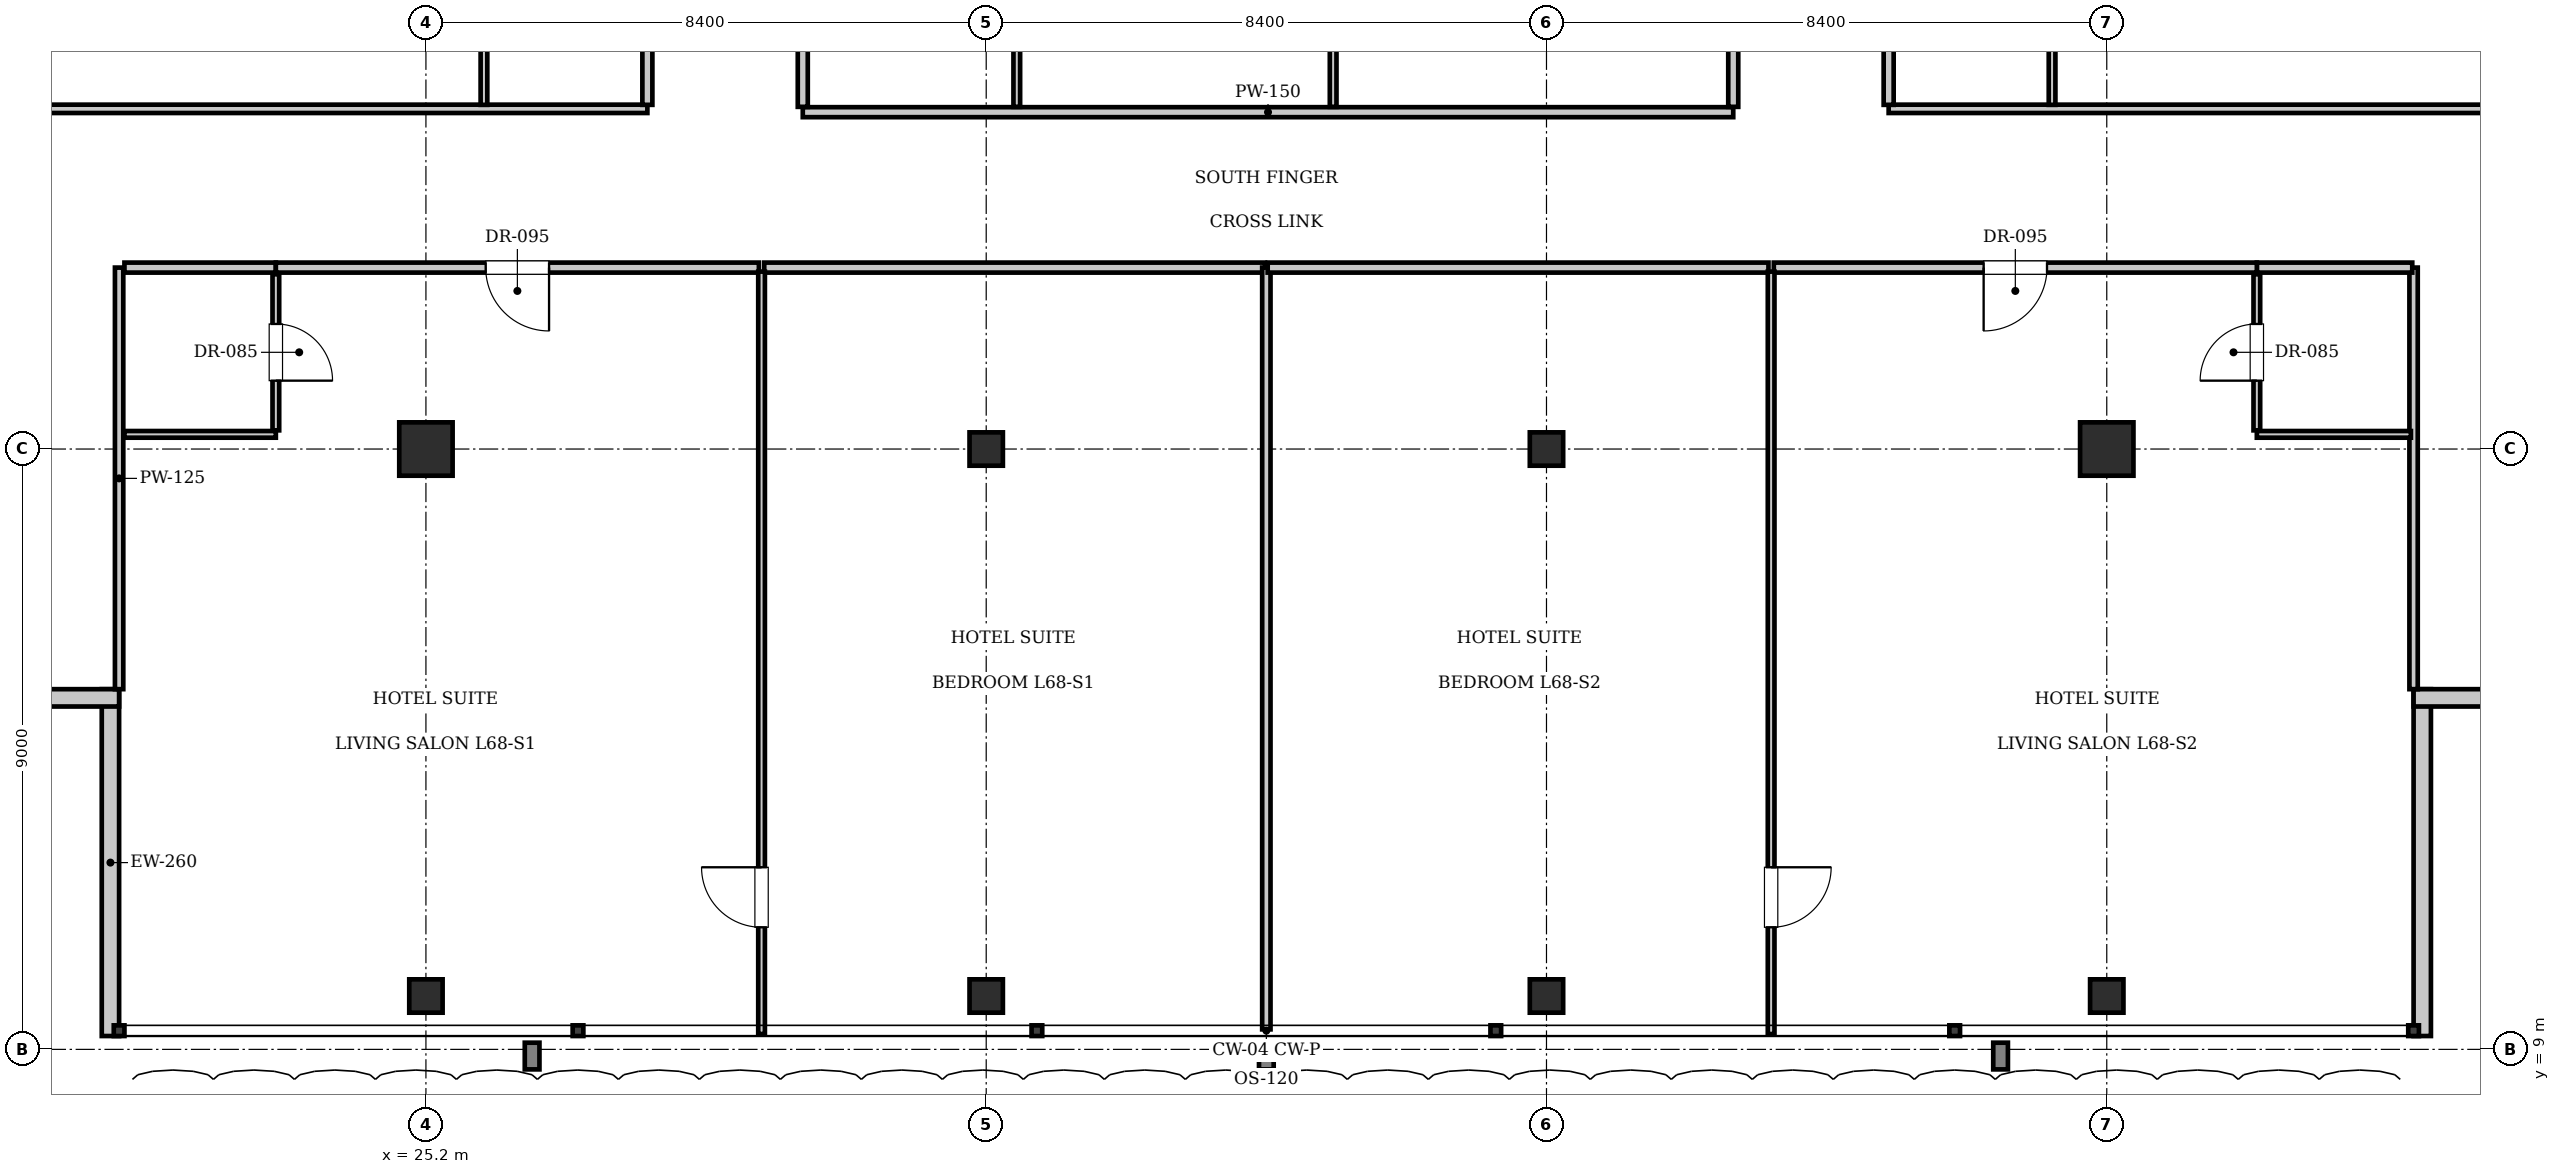
"""IFC4 building model, lengths in metres.
Left out: names, types, materials, properties, quantities, classifications, styles, units other than length and angle.
Written with IfcOpenShell. Run it as: python <this file> out.ifc"""

import sys

from ifc_helpers import new_model, si_unit, direction, frame, frame_2d, origin, origin_2d, place, context, subcontext, project, spatial, rectangle, i_section, extrude, element, fill, save


model = new_model("IFC4")
c1 = context("Model", 3, precision=1e-05, world=origin(), true_north=direction((0.0, 1.0)))
c2 = subcontext(c1, "Body", "Model", "MODEL_VIEW")
j1 = project(units=[si_unit("LENGTHUNIT", "METRE"), si_unit("PLANEANGLEUNIT", "RADIAN")], contexts=[c1])
p1 = place(None, origin())
s1 = spatial("IfcSite", under=j1, at=p1, CompositionType="ELEMENT")
p2 = place(p1, origin())
s2 = spatial("IfcBuilding", under=s1, at=p2, CompositionType="ELEMENT")
p3 = place(p2, frame((0.0, 0.0, 277.9)))
s3 = spatial("IfcBuildingStorey", under=s2, at=p3, CompositionType="ELEMENT", Elevation=277.9)
for number, where, z_axis, x_axis in (
    (1, (25.2, 18.0, 0.0), (0.0, 0.0, 1.0), (1.0, 0.0, 0.0)),
    (2, (50.4, 18.0, 0.0), (0.0, 0.0, 1.0), (1.0, 0.0, 0.0)),
):
    element("IfcColumn", number, at=place(p3, frame(where, z_axis=z_axis, x_axis=x_axis)), inside=s3, PredefinedType="COLUMN", context=c2, shape_type="SweptSolid", body=[
        extrude(rectangle(XDim=0.8, YDim=0.8, at=origin_2d()), origin(), (0.0, 0.0, 1.0), 3.85),
    ])
for number, where, z_axis, x_axis in (
    (3, (33.6, 18.0, 0.0), (0.0, 0.0, 1.0), (1.0, 0.0, 0.0)),
    (4, (42.0, 18.0, 0.0), (0.0, 0.0, 1.0), (1.0, 0.0, 0.0)),
    (5, (25.2, 9.8, 0.0), (0.0, 0.0, 1.0), (1.0, 0.0, 0.0)),
    (6, (33.6, 9.8, 0.0), (0.0, 0.0, 1.0), (1.0, 0.0, 0.0)),
    (7, (42.0, 9.8, 0.0), (0.0, 0.0, 1.0), (1.0, 0.0, 0.0)),
    (8, (50.4, 9.8, 0.0), (0.0, 0.0, 1.0), (1.0, 0.0, 0.0)),
):
    element("IfcColumn", number, at=place(p3, frame(where, z_axis=z_axis, x_axis=x_axis)), inside=s3, PredefinedType="COLUMN", context=c2, shape_type="SweptSolid", body=[
        extrude(i_section(OverallWidth=0.5, OverallDepth=0.5, WebThickness=0.022, FlangeThickness=0.032, at=origin_2d()), origin(), (0.0, 0.0, 1.0), 3.85),
    ])
p4 = place(p3, frame((20.47, 9.2, 0.0), z_axis=(0.0, 0.0, 1.0), x_axis=(0.0, 1.0, 0.0)))
e9 = element("IfcWall", 9, at=p4, inside=s3, PredefinedType="SOLIDWALL", context=c2, shape_type="SweptSolid", body=[
    extrude(rectangle(XDim=5.2, YDim=0.26, at=frame_2d((2.6, 0.0))), origin(), (0.0, 0.0, 1.0), 3.61),
])
p5 = place(p3, frame((20.6, 14.27, 0.0), z_axis=(0.0, 0.0, 1.0), x_axis=(-1.0, 0.0, 0.0)))
e10 = element("IfcWall", 10, at=p5, inside=s3, PredefinedType="SOLIDWALL", context=c2, shape_type="SweptSolid", body=[
    extrude(rectangle(XDim=5.2, YDim=0.26, at=frame_2d((2.6, 0.0))), origin(), (0.0, 0.0, 1.0), 3.61),
])
p6 = place(p5, frame((1.6, 0.0, 0.9)))
e11 = element("IfcOpeningElement", 11, at=p6, cuts=e10, PredefinedType="OPENING", context=c2, shape_type="SweptSolid", body=[
    extrude(rectangle(XDim=2.0, YDim=2.2, at=frame_2d((1.0, 1.1))), frame((0.0, 0.14, 0.0), z_axis=(0.0, -1.0, 0.0), x_axis=(1.0, 0.0, 0.0)), (0.0, 0.0, 1.0), 0.28),
])
p7 = place(p3, frame((55.13, 14.4, 0.0), z_axis=(0.0, 0.0, 1.0), x_axis=(0.0, -1.0, 0.0)))
e12 = element("IfcWall", 12, at=p7, inside=s3, PredefinedType="SOLIDWALL", context=c2, shape_type="SweptSolid", body=[
    extrude(rectangle(XDim=5.2, YDim=0.26, at=frame_2d((2.6, 0.0))), origin(), (0.0, 0.0, 1.0), 3.61),
])
p8 = place(p3, frame((60.2, 14.27, 0.0), z_axis=(0.0, 0.0, 1.0), x_axis=(-1.0, 0.0, 0.0)))
e13 = element("IfcWall", 13, at=p8, inside=s3, PredefinedType="SOLIDWALL", context=c2, shape_type="SweptSolid", body=[
    extrude(rectangle(XDim=5.2, YDim=0.26, at=frame_2d((2.6, 0.0))), origin(), (0.0, 0.0, 1.0), 3.61),
])
p9 = place(p8, frame((1.6, 0.0, 0.9)))
e14 = element("IfcOpeningElement", 14, at=p9, cuts=e13, PredefinedType="OPENING", context=c2, shape_type="SweptSolid", body=[
    extrude(rectangle(XDim=2.0, YDim=2.2, at=frame_2d((1.0, 1.1))), frame((0.0, 0.14, 0.0), z_axis=(0.0, -1.0, 0.0), x_axis=(1.0, 0.0, 0.0)), (0.0, 0.0, 1.0), 0.28),
])
p10 = place(p3, frame((30.85, 23.05, 0.0), z_axis=(0.0, 0.0, 1.0), x_axis=(1.0, 0.0, 0.0)))
e15 = element("IfcWall", 15, at=p10, inside=s3, PredefinedType="PARTITIONING", context=c2, shape_type="SweptSolid", body=[
    extrude(rectangle(XDim=13.95, YDim=0.15, at=frame_2d((6.975, 0.0))), origin(), (0.0, 0.0, 1.0), 3.61),
])
for number, where, z_axis, x_axis in (
    (16, (30.85, 23.13, 0.0), (0.0, 0.0, 1.0), (0.0, 1.0, 0.0)),
    (17, (44.8, 23.13, 0.0), (0.0, 0.0, 1.0), (0.0, 1.0, 0.0)),
):
    element("IfcWall", number, at=place(p3, frame(where, z_axis=z_axis, x_axis=x_axis)), inside=s3, PredefinedType="PARTITIONING", context=c2, shape_type="SweptSolid", body=[
        extrude(rectangle(XDim=7.89, YDim=0.15, at=frame_2d((3.945, 0.0))), origin(), (0.0, 0.0, 1.0), 3.61),
    ])
for number, where, z_axis, x_axis in (
    (18, (34.059, 23.13, 0.0), (0.0, 0.0, 1.0), (0.0, 1.0, 0.0)),
    (19, (38.802, 23.13, 0.0), (0.0, 0.0, 1.0), (0.0, 1.0, 0.0)),
):
    element("IfcWall", number, at=place(p3, frame(where, z_axis=z_axis, x_axis=x_axis)), inside=s3, PredefinedType="PARTITIONING", context=c2, shape_type="SweptSolid", body=[
        extrude(rectangle(XDim=7.89, YDim=0.1, at=frame_2d((3.945, 0.0))), origin(), (0.0, 0.0, 1.0), 3.61),
    ])
for number, where, z_axis, x_axis in (
    (20, (20.6, 14.4, 0.0), (0.0, 0.0, 1.0), (0.0, 1.0, 0.0)),
    (21, (55.0, 14.4, 0.0), (0.0, 0.0, 1.0), (0.0, 1.0, 0.0)),
):
    element("IfcWall", number, at=place(p3, frame(where, z_axis=z_axis, x_axis=x_axis)), inside=s3, PredefinedType="PARTITIONING", context=c2, shape_type="SweptSolid", body=[
        extrude(rectangle(XDim=6.32, YDim=0.125, at=frame_2d((3.16, 0.0))), origin(), (0.0, 0.0, 1.0), 3.61),
    ])
p11 = place(p3, frame((20.68, 20.72, 0.0), z_axis=(0.0, 0.0, 1.0), x_axis=(1.0, 0.0, 0.0)))
e22 = element("IfcWall", 22, at=p11, inside=s3, PredefinedType="PARTITIONING", context=c2, shape_type="SweptSolid", body=[
    extrude(rectangle(XDim=2.27, YDim=0.15, at=frame_2d((1.135, 0.0))), origin(), (0.0, 0.0, 1.0), 3.61),
])
p12 = place(p3, frame((20.68, 18.22, 0.0), z_axis=(0.0, 0.0, 1.0), x_axis=(1.0, 0.0, 0.0)))
e23 = element("IfcWall", 23, at=p12, inside=s3, PredefinedType="PARTITIONING", context=c2, shape_type="SweptSolid", body=[
    extrude(rectangle(XDim=2.27, YDim=0.1, at=frame_2d((1.135, 0.0))), origin(), (0.0, 0.0, 1.0), 3.61),
])
p13 = place(p3, frame((22.95, 18.28, 0.0), z_axis=(0.0, 0.0, 1.0), x_axis=(0.0, 1.0, 0.0)))
e24 = element("IfcWall", 24, at=p13, inside=s3, PredefinedType="PARTITIONING", context=c2, shape_type="SweptSolid", body=[
    extrude(rectangle(XDim=2.34, YDim=0.1, at=frame_2d((1.17, 0.0))), origin(), (0.0, 0.0, 1.0), 3.61),
])
p14 = place(p13, frame((0.745, 0.0, 0.0)))
e25 = element("IfcOpeningElement", 25, at=p14, cuts=e24, PredefinedType="OPENING", context=c2, shape_type="SweptSolid", body=[
    extrude(rectangle(XDim=0.85, YDim=2.1, at=frame_2d((0.425, 1.05))), frame((0.0, 0.06, 0.0), z_axis=(0.0, -1.0, 0.0), x_axis=(1.0, 0.0, 0.0)), (0.0, 0.0, 1.0), 0.12),
])
p15 = place(p3, frame((22.95, 20.72, 0.0), z_axis=(0.0, 0.0, 1.0), x_axis=(1.0, 0.0, 0.0)))
e26 = element("IfcWall", 26, at=p15, inside=s3, PredefinedType="PARTITIONING", context=c2, shape_type="SweptSolid", body=[
    extrude(rectangle(XDim=7.242, YDim=0.15, at=frame_2d((3.621, 0.0))), origin(), (0.0, 0.0, 1.0), 3.61),
])
p16 = place(p15, frame((3.146, 0.0, 0.0)))
e27 = element("IfcOpeningElement", 27, at=p16, cuts=e26, PredefinedType="OPENING", context=c2, shape_type="SweptSolid", body=[
    extrude(rectangle(XDim=0.95, YDim=2.15, at=frame_2d((0.475, 1.075))), frame((0.0, 0.085, 0.0), z_axis=(0.0, -1.0, 0.0), x_axis=(1.0, 0.0, 0.0)), (0.0, 0.0, 1.0), 0.17),
])
p17 = place(p3, frame((30.272, 20.72, 0.0), z_axis=(0.0, 0.0, 1.0), x_axis=(1.0, 0.0, 0.0)))
e28 = element("IfcWall", 28, at=p17, inside=s3, PredefinedType="PARTITIONING", context=c2, shape_type="SweptSolid", body=[
    extrude(rectangle(XDim=7.508, YDim=0.15, at=frame_2d((3.754, 0.0))), origin(), (0.0, 0.0, 1.0), 3.61),
])
p18 = place(p3, frame((30.232, 9.23, 0.0), z_axis=(0.0, 0.0, 1.0), x_axis=(0.0, 1.0, 0.0)))
e29 = element("IfcWall", 29, at=p18, inside=s3, PredefinedType="PARTITIONING", context=c2, shape_type="SweptSolid", body=[
    extrude(rectangle(XDim=11.43, YDim=0.1, at=frame_2d((5.715, 0.0))), origin(), (0.0, 0.0, 1.0), 3.61),
])
p19 = place(p18, frame((1.6, 0.0, 0.0)))
e30 = element("IfcOpeningElement", 30, at=p19, cuts=e29, PredefinedType="OPENING", context=c2, shape_type="SweptSolid", body=[
    extrude(rectangle(XDim=0.9, YDim=2.1, at=frame_2d((0.45, 1.05))), frame((0.0, 0.06, 0.0), z_axis=(0.0, -1.0, 0.0), x_axis=(1.0, 0.0, 0.0)), (0.0, 0.0, 1.0), 0.12),
])
p20 = place(p3, frame((37.8, 9.3, 0.0), z_axis=(0.0, 0.0, 1.0), x_axis=(0.0, 1.0, 0.0)))
e31 = element("IfcWall", 31, at=p20, inside=s3, PredefinedType="PARTITIONING", context=c2, shape_type="SweptSolid", body=[
    extrude(rectangle(XDim=11.42, YDim=0.125, at=frame_2d((5.71, 0.0))), origin(), (0.0, 0.0, 1.0), 3.293),
])
p21 = place(p3, frame((52.65, 20.72, 0.0), z_axis=(0.0, 0.0, 1.0), x_axis=(1.0, 0.0, 0.0)))
e32 = element("IfcWall", 32, at=p21, inside=s3, PredefinedType="PARTITIONING", context=c2, shape_type="SweptSolid", body=[
    extrude(rectangle(XDim=2.33, YDim=0.15, at=frame_2d((1.165, 0.0))), origin(), (0.0, 0.0, 1.0), 3.61),
])
p22 = place(p3, frame((52.65, 18.22, 0.0), z_axis=(0.0, 0.0, 1.0), x_axis=(1.0, 0.0, 0.0)))
e33 = element("IfcWall", 33, at=p22, inside=s3, PredefinedType="PARTITIONING", context=c2, shape_type="SweptSolid", body=[
    extrude(rectangle(XDim=2.31, YDim=0.1, at=frame_2d((1.155, 0.0))), origin(), (0.0, 0.0, 1.0), 3.61),
])
p23 = place(p3, frame((52.65, 18.28, 0.0), z_axis=(0.0, 0.0, 1.0), x_axis=(0.0, 1.0, 0.0)))
e34 = element("IfcWall", 34, at=p23, inside=s3, PredefinedType="PARTITIONING", context=c2, shape_type="SweptSolid", body=[
    extrude(rectangle(XDim=2.34, YDim=0.1, at=frame_2d((1.17, 0.0))), origin(), (0.0, 0.0, 1.0), 3.61),
])
p24 = place(p23, frame((0.745, 0.0, 0.0)))
e35 = element("IfcOpeningElement", 35, at=p24, cuts=e34, PredefinedType="OPENING", context=c2, shape_type="SweptSolid", body=[
    extrude(rectangle(XDim=0.85, YDim=2.1, at=frame_2d((0.425, 1.05))), frame((0.0, 0.06, 0.0), z_axis=(0.0, -1.0, 0.0), x_axis=(1.0, 0.0, 0.0)), (0.0, 0.0, 1.0), 0.12),
])
p25 = place(p3, frame((37.82, 20.72, 0.0), z_axis=(0.0, 0.0, 1.0), x_axis=(1.0, 0.0, 0.0)))
e36 = element("IfcWall", 36, at=p25, inside=s3, PredefinedType="PARTITIONING", context=c2, shape_type="SweptSolid", body=[
    extrude(rectangle(XDim=7.508, YDim=0.15, at=frame_2d((3.754, 0.0))), origin(), (0.0, 0.0, 1.0), 3.61),
])
p26 = place(p3, frame((45.408, 20.72, 0.0), z_axis=(0.0, 0.0, 1.0), x_axis=(1.0, 0.0, 0.0)))
e37 = element("IfcWall", 37, at=p26, inside=s3, PredefinedType="PARTITIONING", context=c2, shape_type="SweptSolid", body=[
    extrude(rectangle(XDim=7.242, YDim=0.15, at=frame_2d((3.621, 0.0))), origin(), (0.0, 0.0, 1.0), 3.61),
])
p27 = place(p26, frame((3.146, 0.0, 0.0)))
e38 = element("IfcOpeningElement", 38, at=p27, cuts=e37, PredefinedType="OPENING", context=c2, shape_type="SweptSolid", body=[
    extrude(rectangle(XDim=0.95, YDim=2.15, at=frame_2d((0.475, 1.075))), frame((0.0, 0.085, 0.0), z_axis=(0.0, -1.0, 0.0), x_axis=(1.0, 0.0, 0.0)), (0.0, 0.0, 1.0), 0.17),
])
p28 = place(p3, frame((45.368, 9.23, 0.0), z_axis=(0.0, 0.0, 1.0), x_axis=(0.0, 1.0, 0.0)))
e39 = element("IfcWall", 39, at=p28, inside=s3, PredefinedType="PARTITIONING", context=c2, shape_type="SweptSolid", body=[
    extrude(rectangle(XDim=11.43, YDim=0.1, at=frame_2d((5.715, 0.0))), origin(), (0.0, 0.0, 1.0), 3.61),
])
p29 = place(p28, frame((1.6, 0.0, 0.0)))
e40 = element("IfcOpeningElement", 40, at=p29, cuts=e39, PredefinedType="OPENING", context=c2, shape_type="SweptSolid", body=[
    extrude(rectangle(XDim=0.9, YDim=2.1, at=frame_2d((0.45, 1.05))), frame((0.0, 0.06, 0.0), z_axis=(0.0, -1.0, 0.0), x_axis=(1.0, 0.0, 0.0)), (0.0, 0.0, 1.0), 0.12),
])
p30 = place(p3, frame((15.5, 23.1, 0.0), z_axis=(0.0, 0.0, 1.0), x_axis=(1.0, 0.0, 0.0)))
e41 = element("IfcWall", 41, at=p30, inside=s3, PredefinedType="PARTITIONING", context=c2, shape_type="SweptSolid", body=[
    extrude(rectangle(XDim=13.02, YDim=0.125, at=frame_2d((6.51, 0.0))), origin(), (0.0, 0.0, 1.0), 3.61),
])
p31 = place(p3, frame((47.13, 23.1, 0.0), z_axis=(0.0, 0.0, 1.0), x_axis=(1.0, 0.0, 0.0)))
e42 = element("IfcWall", 42, at=p31, inside=s3, PredefinedType="PARTITIONING", context=c2, shape_type="SweptSolid", body=[
    extrude(rectangle(XDim=12.97, YDim=0.125, at=frame_2d((6.485, 0.0))), origin(), (0.0, 0.0, 1.0), 3.61),
])
p32 = place(p3, frame((28.52, 23.16, 0.0), z_axis=(0.0, 0.0, 1.0), x_axis=(0.0, 1.0, 0.0)))
e43 = element("IfcWall", 43, at=p32, inside=s3, PredefinedType="PARTITIONING", context=c2, shape_type="SweptSolid", body=[
    extrude(rectangle(XDim=1.89, YDim=0.15, at=frame_2d((0.945, 0.0))), origin(), (0.0, 0.0, 1.0), 3.61),
])
p33 = place(p3, frame((26.07, 23.16, 0.0), z_axis=(0.0, 0.0, 1.0), x_axis=(0.0, 1.0, 0.0)))
e44 = element("IfcWall", 44, at=p33, inside=s3, PredefinedType="PARTITIONING", context=c2, shape_type="SweptSolid", body=[
    extrude(rectangle(XDim=1.89, YDim=0.1, at=frame_2d((0.945, 0.0))), origin(), (0.0, 0.0, 1.0), 3.61),
])
p34 = place(p3, frame((47.13, 23.16, 0.0), z_axis=(0.0, 0.0, 1.0), x_axis=(0.0, 1.0, 0.0)))
e45 = element("IfcWall", 45, at=p34, inside=s3, PredefinedType="PARTITIONING", context=c2, shape_type="SweptSolid", body=[
    extrude(rectangle(XDim=1.89, YDim=0.15, at=frame_2d((0.945, 0.0))), origin(), (0.0, 0.0, 1.0), 3.61),
])
p35 = place(p3, frame((49.58, 23.16, 0.0), z_axis=(0.0, 0.0, 1.0), x_axis=(0.0, 1.0, 0.0)))
e46 = element("IfcWall", 46, at=p35, inside=s3, PredefinedType="PARTITIONING", context=c2, shape_type="SweptSolid", body=[
    extrude(rectangle(XDim=1.89, YDim=0.1, at=frame_2d((0.945, 0.0))), origin(), (0.0, 0.0, 1.0), 3.61),
])
p36 = place(p14, frame((0.85, 0.0, 0.0), z_axis=(0.0, 0.0, 1.0), x_axis=(-1.0, 0.0, 0.0)))
e47 = element("IfcDoor", 47, at=p36, inside=s3, OperationType="SINGLE_SWING_RIGHT", PredefinedType="DOOR", context=c2, shape_type="SweptSolid", body=[
    extrude(rectangle(XDim=0.85, YDim=2.1, at=frame_2d((0.425, 1.05))), frame((0.0, 0.025, 0.0), z_axis=(0.0, -1.0, 0.0), x_axis=(1.0, 0.0, 0.0)), (0.0, 0.0, 1.0), 0.05),
])
fill(e25, e47)
p37 = place(p16, frame((0.95, 0.0, 0.0), z_axis=(0.0, 0.0, 1.0), x_axis=(-1.0, 0.0, 0.0)))
e48 = element("IfcDoor", 48, at=p37, inside=s3, OperationType="SINGLE_SWING_LEFT", PredefinedType="DOOR", context=c2, shape_type="SweptSolid", body=[
    extrude(rectangle(XDim=0.95, YDim=2.15, at=frame_2d((0.475, 1.075))), frame((0.0, 0.025, 0.0), z_axis=(0.0, -1.0, 0.0), x_axis=(1.0, 0.0, 0.0)), (0.0, 0.0, 1.0), 0.05),
])
fill(e27, e48)
p38 = place(p19, origin())
e49 = element("IfcDoor", 49, at=p38, inside=s3, OperationType="SINGLE_SWING_RIGHT", PredefinedType="DOOR", context=c2, shape_type="SweptSolid", body=[
    extrude(rectangle(XDim=0.9, YDim=2.1, at=frame_2d((0.45, 1.05))), frame((0.0, 0.025, 0.0), z_axis=(0.0, -1.0, 0.0), x_axis=(1.0, 0.0, 0.0)), (0.0, 0.0, 1.0), 0.05),
])
fill(e30, e49)
p39 = place(p24, origin())
e50 = element("IfcDoor", 50, at=p39, inside=s3, OperationType="SINGLE_SWING_LEFT", PredefinedType="DOOR", context=c2, shape_type="SweptSolid", body=[
    extrude(rectangle(XDim=0.85, YDim=2.1, at=frame_2d((0.425, 1.05))), frame((0.0, 0.025, 0.0), z_axis=(0.0, -1.0, 0.0), x_axis=(1.0, 0.0, 0.0)), (0.0, 0.0, 1.0), 0.05),
])
fill(e35, e50)
p40 = place(p27, frame((0.95, 0.0, 0.0), z_axis=(0.0, 0.0, 1.0), x_axis=(-1.0, 0.0, 0.0)))
e51 = element("IfcDoor", 51, at=p40, inside=s3, OperationType="SINGLE_SWING_RIGHT", PredefinedType="DOOR", context=c2, shape_type="SweptSolid", body=[
    extrude(rectangle(XDim=0.95, YDim=2.15, at=frame_2d((0.475, 1.075))), frame((0.0, 0.025, 0.0), z_axis=(0.0, -1.0, 0.0), x_axis=(1.0, 0.0, 0.0)), (0.0, 0.0, 1.0), 0.05),
])
fill(e38, e51)
p41 = place(p29, frame((0.9, 0.0, 0.0), z_axis=(0.0, 0.0, 1.0), x_axis=(-1.0, 0.0, 0.0)))
e52 = element("IfcDoor", 52, at=p41, inside=s3, OperationType="SINGLE_SWING_LEFT", PredefinedType="DOOR", context=c2, shape_type="SweptSolid", body=[
    extrude(rectangle(XDim=0.9, YDim=2.1, at=frame_2d((0.45, 1.05))), frame((0.0, 0.025, 0.0), z_axis=(0.0, -1.0, 0.0), x_axis=(1.0, 0.0, 0.0)), (0.0, 0.0, 1.0), 0.05),
])
fill(e40, e52)
save(model, sys.argv[1])
